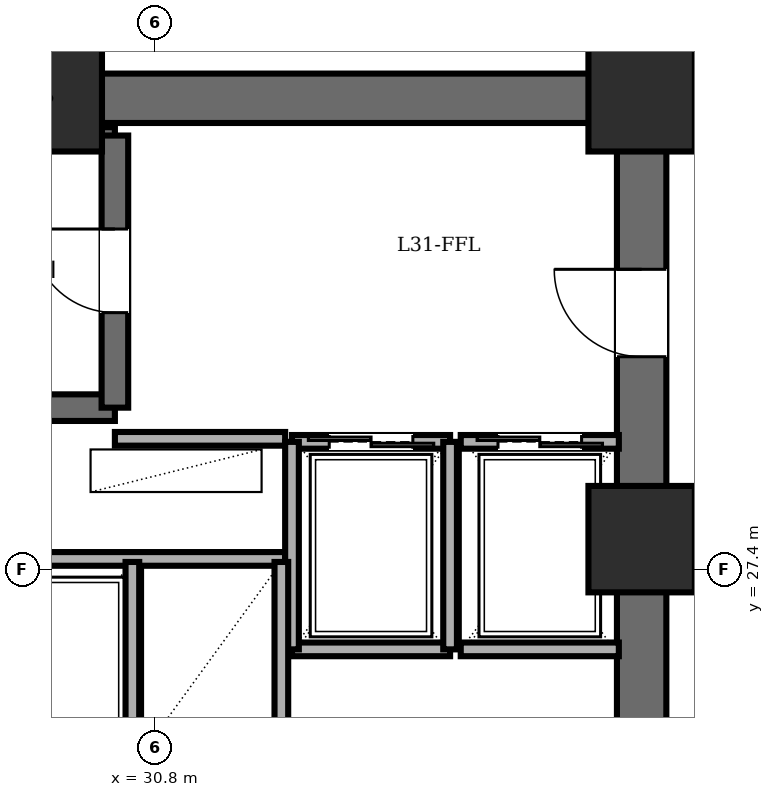
"""IFC4 building model, lengths in metres.
Left out: names, types, materials, properties, quantities, classifications, styles, units other than length and angle.
Written with IfcOpenShell. Run it as: python <this file> out.ifc"""

import sys

from ifc_helpers import new_model, si_unit, direction, frame, frame_2d, origin, origin_2d, place, context, subcontext, project, spatial, rectangle, extrude, element, fill, save


model = new_model("IFC4")
c1 = context("Model", 3, precision=1e-05, world=origin(), true_north=direction((0.0, 1.0)))
c2 = subcontext(c1, "Body", "Model", "MODEL_VIEW")
j1 = project(units=[si_unit("LENGTHUNIT", "METRE"), si_unit("PLANEANGLEUNIT", "RADIAN")], contexts=[c1])
p1 = place(None, origin())
s1 = spatial("IfcSite", under=j1, at=p1, CompositionType="ELEMENT")
p2 = place(p1, origin())
s2 = spatial("IfcBuilding", under=s1, at=p2, CompositionType="ELEMENT")
p3 = place(p2, frame((0.0, 0.0, 118.7)))
s3 = spatial("IfcBuildingStorey", under=s2, at=p3, CompositionType="ELEMENT", Elevation=118.7)
for number, where, z_axis, x_axis in (
    (1, (37.2, 27.8, 0.0), (0.0, 0.0, 1.0), (1.0, 0.0, 0.0)),
    (2, (37.2, 33.6, 0.0), (0.0, 0.0, 1.0), (1.0, 0.0, 0.0)),
    (3, (29.4, 33.6, 0.0), (0.0, 0.0, 1.0), (1.0, 0.0, 0.0)),
):
    element("IfcColumn", number, at=place(p3, frame(where, z_axis=z_axis, x_axis=x_axis)), inside=s3, PredefinedType="COLUMN", context=c2, shape_type="SweptSolid", body=[
        extrude(rectangle(XDim=1.4, YDim=1.4, at=origin_2d()), origin(), (0.0, 0.0, 1.0), 3.6),
    ])
p4 = place(p3, frame((21.6, 33.6, 0.0), z_axis=(0.0, 0.0, 1.0), x_axis=(1.0, 0.0, 0.0)))
e4 = element("IfcWall", 4, at=p4, inside=s3, PredefinedType="SHEAR", context=c2, shape_type="SweptSolid", body=[
    extrude(rectangle(XDim=15.6, YDim=0.65, at=frame_2d((7.8, 0.0))), origin(), (0.0, 0.0, 1.0), 3.4),
])
p5 = place(p3, frame((37.2, 14.4, 0.0), z_axis=(0.0, 0.0, 1.0), x_axis=(0.0, 1.0, 0.0)))
e5 = element("IfcWall", 5, at=p5, inside=s3, PredefinedType="SHEAR", context=c2, shape_type="SweptSolid", body=[
    extrude(rectangle(XDim=19.2, YDim=0.65, at=frame_2d((9.6, 0.0))), origin(), (0.0, 0.0, 1.0), 3.4),
])
p6 = place(p5, frame((15.8, 0.0, 0.0)))
e6 = element("IfcOpeningElement", 6, at=p6, cuts=e5, PredefinedType="OPENING", context=c2, shape_type="SweptSolid", body=[
    extrude(rectangle(XDim=1.15, YDim=2.15, at=frame_2d((0.575, 1.075))), frame((0.0, 0.335, 0.0), z_axis=(0.0, -1.0, 0.0), x_axis=(1.0, 0.0, 0.0)), (0.0, 0.0, 1.0), 0.67),
])
p7 = place(p5, frame((3.6, 0.0, 0.0)))
e7 = element("IfcOpeningElement", 7, at=p7, cuts=e5, PredefinedType="OPENING", context=c2, shape_type="SweptSolid", body=[
    extrude(rectangle(XDim=1.1, YDim=2.15, at=frame_2d((0.55, 1.075))), frame((0.0, 0.335, 0.0), z_axis=(0.0, -1.0, 0.0), x_axis=(1.0, 0.0, 0.0)), (0.0, 0.0, 1.0), 0.67),
])
p8 = place(p5, frame((8.6, 0.0, 0.0)))
e8 = element("IfcOpeningElement", 8, at=p8, cuts=e5, PredefinedType="OPENING", context=c2, shape_type="SweptSolid", body=[
    extrude(rectangle(XDim=1.3, YDim=2.2, at=frame_2d((0.65, 1.1))), frame((0.0, 0.335, 0.0), z_axis=(0.0, -1.0, 0.0), x_axis=(1.0, 0.0, 0.0)), (0.0, 0.0, 1.0), 0.67),
])
p9 = place(p3, frame((22.48, 29.53, 0.0), z_axis=(0.0, 0.0, 1.0), x_axis=(1.0, 0.0, 0.0)))
e9 = element("IfcWall", 9, at=p9, inside=s3, PredefinedType="SOLIDWALL", context=c2, shape_type="SweptSolid", body=[
    extrude(rectangle(XDim=7.79, YDim=0.35, at=frame_2d((3.895, 0.0))), origin(), (0.0, 0.0, 1.0), 3.4),
])
p10 = place(p3, frame((22.48, 33.11, 0.0), z_axis=(0.0, 0.0, 1.0), x_axis=(1.0, 0.0, 0.0)))
e10 = element("IfcWall", 10, at=p10, inside=s3, PredefinedType="PARTITIONING", context=c2, shape_type="SweptSolid", body=[
    extrude(rectangle(XDim=7.79, YDim=0.22, at=frame_2d((3.895, 0.0))), origin(), (0.0, 0.0, 1.0), 3.4),
])
p11 = place(p3, frame((30.27, 29.53, 0.0), z_axis=(0.0, 0.0, 1.0), x_axis=(0.0, 1.0, 0.0)))
e11 = element("IfcWall", 11, at=p11, inside=s3, PredefinedType="SOLIDWALL", context=c2, shape_type="SweptSolid", body=[
    extrude(rectangle(XDim=3.58, YDim=0.35, at=frame_2d((1.79, 0.0))), origin(), (0.0, 0.0, 1.0), 3.4),
])
p12 = place(p11, frame((1.25, 0.0, 0.0)))
e12 = element("IfcOpeningElement", 12, at=p12, cuts=e11, PredefinedType="OPENING", context=c2, shape_type="SweptSolid", body=[
    extrude(rectangle(XDim=1.1, YDim=2.15, at=frame_2d((0.55, 1.075))), frame((0.0, 0.185, 0.0), z_axis=(0.0, -1.0, 0.0), x_axis=(1.0, 0.0, 0.0)), (0.0, 0.0, 1.0), 0.37),
])
p13 = place(p3, frame((30.27, 29.12, 0.0), z_axis=(0.0, 0.0, 1.0), x_axis=(1.0, 0.0, 0.0)))
e13 = element("IfcWall", 13, at=p13, inside=s3, PredefinedType="PARTITIONING", context=c2, shape_type="SweptSolid", body=[
    extrude(rectangle(XDim=2.24, YDim=0.18, at=frame_2d((1.12, 0.0))), origin(), (0.0, 0.0, 1.0), 3.4),
])
p14 = place(p3, frame((21.95, 27.54, 0.0), z_axis=(0.0, 0.0, 1.0), x_axis=(1.0, 0.0, 0.0)))
e14 = element("IfcWall", 14, at=p14, inside=s3, PredefinedType="PARTITIONING", context=c2, shape_type="SweptSolid", body=[
    extrude(rectangle(XDim=10.56, YDim=0.18, at=frame_2d((5.28, 0.0))), origin(), (0.0, 0.0, 1.0), 3.4),
])
p15 = place(p3, frame((32.6, 29.08, 0.0), z_axis=(0.0, 0.0, 1.0), x_axis=(1.0, 0.0, 0.0)))
e15 = element("IfcWall", 15, at=p15, inside=s3, PredefinedType="PARTITIONING", context=c2, shape_type="SweptSolid", body=[
    extrude(rectangle(XDim=2.08, YDim=0.18, at=frame_2d((1.04, 0.0))), origin(), (0.0, 0.0, 1.0), 3.4),
])
p16 = place(p15, frame((0.49, 0.0, 0.0)))
e16 = element("IfcOpeningElement", 16, at=p16, cuts=e15, PredefinedType="OPENING", context=c2, shape_type="SweptSolid", body=[
    extrude(rectangle(XDim=1.1, YDim=2.2, at=frame_2d((0.55, 1.1))), frame((0.0, 0.1, 0.0), z_axis=(0.0, -1.0, 0.0), x_axis=(1.0, 0.0, 0.0)), (0.0, 0.0, 1.0), 0.2),
])
p17 = place(p3, frame((34.68, 26.35, 0.0), z_axis=(0.0, 0.0, 1.0), x_axis=(-1.0, 0.0, 0.0)))
e17 = element("IfcWall", 17, at=p17, inside=s3, PredefinedType="PARTITIONING", context=c2, shape_type="SweptSolid", body=[
    extrude(rectangle(XDim=2.08, YDim=0.18, at=frame_2d((1.04, 0.0))), origin(), (0.0, 0.0, 1.0), 3.4),
])
for number, where, z_axis, x_axis in (
    (18, (34.68, 26.35, 0.0), (0.0, 0.0, 1.0), (0.0, 1.0, 0.0)),
    (19, (32.6, 29.08, 0.0), (0.0, 0.0, 1.0), (0.0, -1.0, 0.0)),
):
    element("IfcWall", number, at=place(p3, frame(where, z_axis=z_axis, x_axis=x_axis)), inside=s3, PredefinedType="PARTITIONING", context=c2, shape_type="SweptSolid", body=[
        extrude(rectangle(XDim=2.73, YDim=0.18, at=frame_2d((1.365, 0.0))), origin(), (0.0, 0.0, 1.0), 3.4),
    ])
p18 = place(p3, frame((34.82, 29.08, 0.0), z_axis=(0.0, 0.0, 1.0), x_axis=(1.0, 0.0, 0.0)))
e20 = element("IfcWall", 20, at=p18, inside=s3, PredefinedType="PARTITIONING", context=c2, shape_type="SweptSolid", body=[
    extrude(rectangle(XDim=2.08, YDim=0.18, at=frame_2d((1.04, 0.0))), origin(), (0.0, 0.0, 1.0), 3.4),
])
p19 = place(p18, frame((0.49, 0.0, 0.0)))
e21 = element("IfcOpeningElement", 21, at=p19, cuts=e20, PredefinedType="OPENING", context=c2, shape_type="SweptSolid", body=[
    extrude(rectangle(XDim=1.1, YDim=2.2, at=frame_2d((0.55, 1.1))), frame((0.0, 0.1, 0.0), z_axis=(0.0, -1.0, 0.0), x_axis=(1.0, 0.0, 0.0)), (0.0, 0.0, 1.0), 0.2),
])
p20 = place(p3, frame((36.9, 26.35, 0.0), z_axis=(0.0, 0.0, 1.0), x_axis=(-1.0, 0.0, 0.0)))
e22 = element("IfcWall", 22, at=p20, inside=s3, PredefinedType="PARTITIONING", context=c2, shape_type="SweptSolid", body=[
    extrude(rectangle(XDim=2.08, YDim=0.18, at=frame_2d((1.04, 0.0))), origin(), (0.0, 0.0, 1.0), 3.4),
])
for number, where, z_axis, x_axis in (
    (23, (30.5, 25.0, 0.0), (0.0, 0.0, 1.0), (0.0, 1.0, 0.0)),
    (24, (32.46, 25.0, 0.0), (0.0, 0.0, 1.0), (0.0, 1.0, 0.0)),
):
    element("IfcWall", number, at=place(p3, frame(where, z_axis=z_axis, x_axis=x_axis)), inside=s3, PredefinedType="PARTITIONING", context=c2, shape_type="SweptSolid", body=[
        extrude(rectangle(XDim=2.5, YDim=0.18, at=frame_2d((1.25, 0.0))), origin(), (0.0, 0.0, 1.0), 3.4),
    ])
p21 = place(p12, origin())
e25 = element("IfcDoor", 25, at=p21, inside=s3, OperationType="SINGLE_SWING_RIGHT", PredefinedType="DOOR", context=c2, shape_type="SweptSolid", body=[
    extrude(rectangle(XDim=1.1, YDim=2.15, at=frame_2d((0.55, 1.075))), frame((0.0, 0.025, 0.0), z_axis=(0.0, -1.0, 0.0), x_axis=(1.0, 0.0, 0.0)), (0.0, 0.0, 1.0), 0.05),
])
fill(e12, e25)
p22 = place(p6, origin())
e26 = element("IfcDoor", 26, at=p22, inside=s3, OperationType="SINGLE_SWING_RIGHT", PredefinedType="DOOR", context=c2, shape_type="SweptSolid", body=[
    extrude(rectangle(XDim=1.15, YDim=2.15, at=frame_2d((0.575, 1.075))), frame((0.0, 0.025, 0.0), z_axis=(0.0, -1.0, 0.0), x_axis=(1.0, 0.0, 0.0)), (0.0, 0.0, 1.0), 0.05),
])
fill(e6, e26)
p23 = place(p16, origin())
e27 = element("IfcDoor", 27, at=p23, inside=s3, OperationType="DOUBLE_DOOR_SLIDING", PredefinedType="DOOR", context=c2, shape_type="SweptSolid", body=[
    extrude(rectangle(XDim=1.1, YDim=2.2, at=frame_2d((0.55, 1.1))), frame((0.0, 0.025, 0.0), z_axis=(0.0, -1.0, 0.0), x_axis=(1.0, 0.0, 0.0)), (0.0, 0.0, 1.0), 0.05),
])
fill(e16, e27)
p24 = place(p19, origin())
e28 = element("IfcDoor", 28, at=p24, inside=s3, OperationType="DOUBLE_DOOR_SLIDING", PredefinedType="DOOR", context=c2, shape_type="SweptSolid", body=[
    extrude(rectangle(XDim=1.1, YDim=2.2, at=frame_2d((0.55, 1.1))), frame((0.0, 0.025, 0.0), z_axis=(0.0, -1.0, 0.0), x_axis=(1.0, 0.0, 0.0)), (0.0, 0.0, 1.0), 0.05),
])
fill(e21, e28)
save(model, sys.argv[1])
